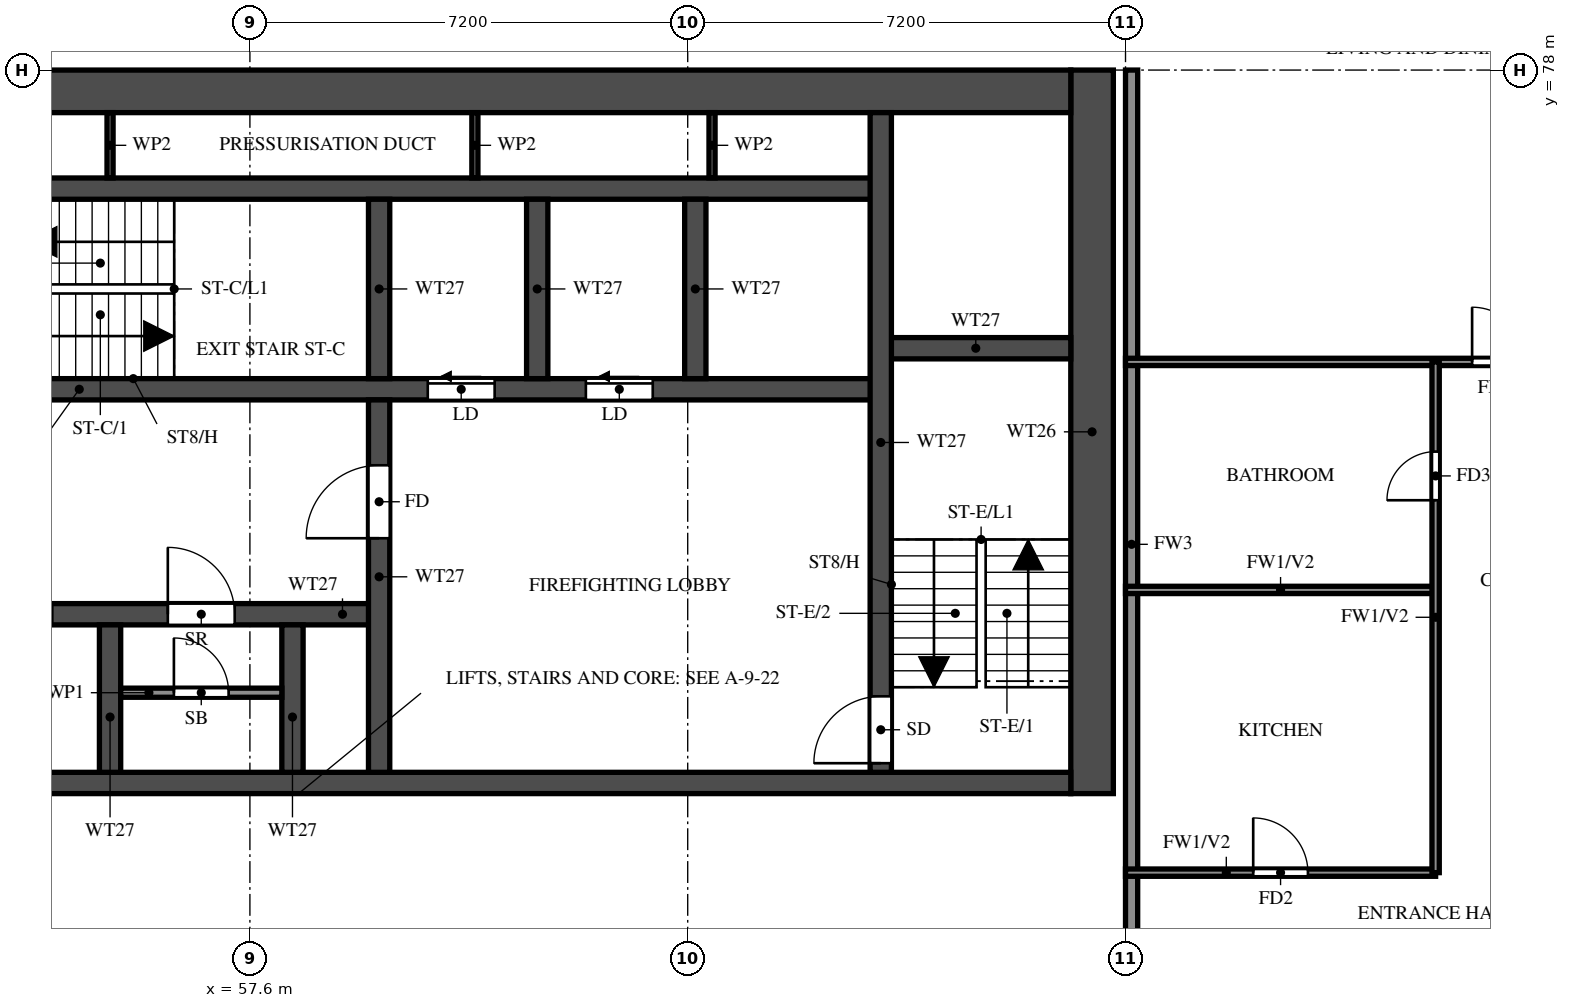
"""IFC4 building model, lengths in metres.
Left out: names, types, materials, properties, quantities, classifications, styles, units other than length and angle.
Written with IfcOpenShell. Run it as: python <this file> out.ifc"""

import sys

from ifc_helpers import new_model, si_unit, direction, frame, frame_2d, origin, place, context, subcontext, project, spatial, rectangle, extrude, element, fill, save


model = new_model("IFC4")
c1 = context("Model", 3, precision=1e-05, world=origin(), true_north=direction((0.0, 1.0)))
c2 = subcontext(c1, "Body", "Model", "MODEL_VIEW")
j1 = project(units=[si_unit("LENGTHUNIT", "METRE"), si_unit("PLANEANGLEUNIT", "RADIAN")], contexts=[c1])
p1 = place(None, origin())
s1 = spatial("IfcSite", under=j1, at=p1, CompositionType="ELEMENT")
p2 = place(p1, origin())
s2 = spatial("IfcBuilding", under=s1, at=p2, CompositionType="ELEMENT")
p3 = place(p2, frame((0.0, 0.0, 157.0)))
s3 = spatial("IfcBuildingStorey", under=s2, at=p3, CompositionType="ELEMENT", Elevation=157.0)
p4 = place(p3, frame((71.45, 66.1, 0.0), z_axis=(0.0, 0.0, 1.0), x_axis=(0.0, 1.0, 0.0)))
e1 = element("IfcWall", 1, at=p4, inside=s3, PredefinedType="SHEAR", context=c2, shape_type="SweptSolid", body=[
    extrude(rectangle(XDim=11.9, YDim=0.7, at=frame_2d((5.95, 0.0))), origin(), (0.0, 0.0, 1.0), 3.2),
])
p5 = place(p3, frame((29.7, 77.65, 0.0), z_axis=(0.0, 0.0, 1.0), x_axis=(1.0, 0.0, 0.0)))
e2 = element("IfcWall", 2, at=p5, inside=s3, PredefinedType="SHEAR", context=c2, shape_type="SweptSolid", body=[
    extrude(rectangle(XDim=41.4, YDim=0.7, at=frame_2d((20.7, 0.0))), origin(), (0.0, 0.0, 1.0), 3.2),
])
p6 = place(p3, frame((29.7, 66.275, 0.0), z_axis=(0.0, 0.0, 1.0), x_axis=(1.0, 0.0, 0.0)))
e3 = element("IfcWall", 3, at=p6, inside=s3, PredefinedType="SHEAR", context=c2, shape_type="SweptSolid", body=[
    extrude(rectangle(XDim=41.4, YDim=0.35, at=frame_2d((20.7, 0.0))), origin(), (0.0, 0.0, 1.0), 3.2),
])
p7 = place(p6, frame((0.925, 0.0, 0.0)))
e4 = element("IfcOpeningElement", 4, at=p7, cuts=e3, PredefinedType="OPENING", context=c2, shape_type="SweptSolid", body=[
    extrude(rectangle(XDim=1.1, YDim=2.1, at=frame_2d((0.55, 1.05))), frame((0.0, 0.185, 0.0), z_axis=(0.0, -1.0, 0.0), x_axis=(1.0, 0.0, 0.0)), (0.0, 0.0, 1.0), 0.37),
])
p8 = place(p6, frame((3.712, 0.0, 0.0)))
e5 = element("IfcOpeningElement", 5, at=p8, cuts=e3, PredefinedType="OPENING", context=c2, shape_type="SweptSolid", body=[
    extrude(rectangle(XDim=1.8, YDim=2.1, at=frame_2d((0.9, 1.05))), frame((0.0, 0.185, 0.0), z_axis=(0.0, -1.0, 0.0), x_axis=(1.0, 0.0, 0.0)), (0.0, 0.0, 1.0), 0.37),
])
p9 = place(p3, frame((35.625, 69.05, 0.0), z_axis=(0.0, 0.0, 1.0), x_axis=(1.0, 0.0, 0.0)))
e6 = element("IfcWall", 6, at=p9, inside=s3, PredefinedType="SHEAR", context=c2, shape_type="SweptSolid", body=[
    extrude(rectangle(XDim=24.1, YDim=0.35, at=frame_2d((12.05, 0.0))), origin(), (0.0, 0.0, 1.0), 3.2),
])
p10 = place(p9, frame((1.0, 0.0, 0.0)))
e7 = element("IfcOpeningElement", 7, at=p10, cuts=e6, PredefinedType="OPENING", context=c2, shape_type="SweptSolid", body=[
    extrude(rectangle(XDim=1.1, YDim=2.1, at=frame_2d((0.55, 1.05))), frame((0.0, 0.185, 0.0), z_axis=(0.0, -1.0, 0.0), x_axis=(1.0, 0.0, 0.0)), (0.0, 0.0, 1.0), 0.37),
])
p11 = place(p9, frame((3.75, 0.0, 0.0)))
e8 = element("IfcOpeningElement", 8, at=p11, cuts=e6, PredefinedType="OPENING", context=c2, shape_type="SweptSolid", body=[
    extrude(rectangle(XDim=1.1, YDim=2.1, at=frame_2d((0.55, 1.05))), frame((0.0, 0.185, 0.0), z_axis=(0.0, -1.0, 0.0), x_axis=(1.0, 0.0, 0.0)), (0.0, 0.0, 1.0), 0.37),
])
p12 = place(p9, frame((6.5, 0.0, 0.0)))
e9 = element("IfcOpeningElement", 9, at=p12, cuts=e6, PredefinedType="OPENING", context=c2, shape_type="SweptSolid", body=[
    extrude(rectangle(XDim=1.1, YDim=2.1, at=frame_2d((0.55, 1.05))), frame((0.0, 0.185, 0.0), z_axis=(0.0, -1.0, 0.0), x_axis=(1.0, 0.0, 0.0)), (0.0, 0.0, 1.0), 0.37),
])
p13 = place(p9, frame((9.25, 0.0, 0.0)))
e10 = element("IfcOpeningElement", 10, at=p13, cuts=e6, PredefinedType="OPENING", context=c2, shape_type="SweptSolid", body=[
    extrude(rectangle(XDim=1.1, YDim=2.1, at=frame_2d((0.55, 1.05))), frame((0.0, 0.185, 0.0), z_axis=(0.0, -1.0, 0.0), x_axis=(1.0, 0.0, 0.0)), (0.0, 0.0, 1.0), 0.37),
])
p14 = place(p9, frame((12.0, 0.0, 0.0)))
e11 = element("IfcOpeningElement", 11, at=p14, cuts=e6, PredefinedType="OPENING", context=c2, shape_type="SweptSolid", body=[
    extrude(rectangle(XDim=1.1, YDim=2.1, at=frame_2d((0.55, 1.05))), frame((0.0, 0.185, 0.0), z_axis=(0.0, -1.0, 0.0), x_axis=(1.0, 0.0, 0.0)), (0.0, 0.0, 1.0), 0.37),
])
p15 = place(p9, frame((14.75, 0.0, 0.0)))
e12 = element("IfcOpeningElement", 12, at=p15, cuts=e6, PredefinedType="OPENING", context=c2, shape_type="SweptSolid", body=[
    extrude(rectangle(XDim=1.1, YDim=2.1, at=frame_2d((0.55, 1.05))), frame((0.0, 0.185, 0.0), z_axis=(0.0, -1.0, 0.0), x_axis=(1.0, 0.0, 0.0)), (0.0, 0.0, 1.0), 0.37),
])
p16 = place(p9, frame((17.625, 0.0, 0.0)))
e13 = element("IfcOpeningElement", 13, at=p16, cuts=e6, PredefinedType="OPENING", context=c2, shape_type="SweptSolid", body=[
    extrude(rectangle(XDim=1.1, YDim=2.1, at=frame_2d((0.55, 1.05))), frame((0.0, 0.185, 0.0), z_axis=(0.0, -1.0, 0.0), x_axis=(1.0, 0.0, 0.0)), (0.0, 0.0, 1.0), 0.37),
])
p17 = place(p9, frame((20.625, 0.0, 0.0)))
e14 = element("IfcOpeningElement", 14, at=p17, cuts=e6, PredefinedType="OPENING", context=c2, shape_type="SweptSolid", body=[
    extrude(rectangle(XDim=1.1, YDim=2.1, at=frame_2d((0.55, 1.05))), frame((0.0, 0.185, 0.0), z_axis=(0.0, -1.0, 0.0), x_axis=(1.0, 0.0, 0.0)), (0.0, 0.0, 1.0), 0.37),
])
p18 = place(p3, frame((32.825, 72.75, 0.0), z_axis=(0.0, 0.0, 1.0), x_axis=(1.0, 0.0, 0.0)))
e15 = element("IfcWall", 15, at=p18, inside=s3, PredefinedType="SHEAR", context=c2, shape_type="SweptSolid", body=[
    extrude(rectangle(XDim=35.15, YDim=0.35, at=frame_2d((17.575, 0.0))), origin(), (0.0, 0.0, 1.0), 3.2),
])
p19 = place(p18, frame((19.8, 0.0, 0.0)))
e16 = element("IfcOpeningElement", 16, at=p19, cuts=e15, PredefinedType="OPENING", context=c2, shape_type="SweptSolid", body=[
    extrude(rectangle(XDim=1.1, YDim=2.1, at=frame_2d((0.55, 1.05))), frame((0.0, 0.185, 0.0), z_axis=(0.0, -1.0, 0.0), x_axis=(1.0, 0.0, 0.0)), (0.0, 0.0, 1.0), 0.37),
])
p20 = place(p18, frame((27.7, 0.0, 0.0)))
e17 = element("IfcOpeningElement", 17, at=p20, cuts=e15, PredefinedType="OPENING", context=c2, shape_type="SweptSolid", body=[
    extrude(rectangle(XDim=1.1, YDim=2.1, at=frame_2d((0.55, 1.05))), frame((0.0, 0.185, 0.0), z_axis=(0.0, -1.0, 0.0), x_axis=(1.0, 0.0, 0.0)), (0.0, 0.0, 1.0), 0.37),
])
p21 = place(p18, frame((30.3, 0.0, 0.0)))
e18 = element("IfcOpeningElement", 18, at=p21, cuts=e15, PredefinedType="OPENING", context=c2, shape_type="SweptSolid", body=[
    extrude(rectangle(XDim=1.1, YDim=2.1, at=frame_2d((0.55, 1.05))), frame((0.0, 0.185, 0.0), z_axis=(0.0, -1.0, 0.0), x_axis=(1.0, 0.0, 0.0)), (0.0, 0.0, 1.0), 0.37),
])
p22 = place(p18, frame((3.8, 0.0, 0.0)))
e19 = element("IfcOpeningElement", 19, at=p22, cuts=e15, PredefinedType="OPENING", context=c2, shape_type="SweptSolid", body=[
    extrude(rectangle(XDim=1.1, YDim=2.1, at=frame_2d((0.55, 1.05))), frame((0.0, 0.185, 0.0), z_axis=(0.0, -1.0, 0.0), x_axis=(1.0, 0.0, 0.0)), (0.0, 0.0, 1.0), 0.37),
])
p23 = place(p18, frame((6.55, 0.0, 0.0)))
e20 = element("IfcOpeningElement", 20, at=p23, cuts=e15, PredefinedType="OPENING", context=c2, shape_type="SweptSolid", body=[
    extrude(rectangle(XDim=1.1, YDim=2.1, at=frame_2d((0.55, 1.05))), frame((0.0, 0.185, 0.0), z_axis=(0.0, -1.0, 0.0), x_axis=(1.0, 0.0, 0.0)), (0.0, 0.0, 1.0), 0.37),
])
p24 = place(p18, frame((9.3, 0.0, 0.0)))
e21 = element("IfcOpeningElement", 21, at=p24, cuts=e15, PredefinedType="OPENING", context=c2, shape_type="SweptSolid", body=[
    extrude(rectangle(XDim=1.1, YDim=2.1, at=frame_2d((0.55, 1.05))), frame((0.0, 0.185, 0.0), z_axis=(0.0, -1.0, 0.0), x_axis=(1.0, 0.0, 0.0)), (0.0, 0.0, 1.0), 0.37),
])
p25 = place(p18, frame((12.05, 0.0, 0.0)))
e22 = element("IfcOpeningElement", 22, at=p25, cuts=e15, PredefinedType="OPENING", context=c2, shape_type="SweptSolid", body=[
    extrude(rectangle(XDim=1.1, YDim=2.1, at=frame_2d((0.55, 1.05))), frame((0.0, 0.185, 0.0), z_axis=(0.0, -1.0, 0.0), x_axis=(1.0, 0.0, 0.0)), (0.0, 0.0, 1.0), 0.37),
])
p26 = place(p18, frame((14.8, 0.0, 0.0)))
e23 = element("IfcOpeningElement", 23, at=p26, cuts=e15, PredefinedType="OPENING", context=c2, shape_type="SweptSolid", body=[
    extrude(rectangle(XDim=1.1, YDim=2.1, at=frame_2d((0.55, 1.05))), frame((0.0, 0.185, 0.0), z_axis=(0.0, -1.0, 0.0), x_axis=(1.0, 0.0, 0.0)), (0.0, 0.0, 1.0), 0.37),
])
p27 = place(p18, frame((17.55, 0.0, 0.0)))
e24 = element("IfcOpeningElement", 24, at=p27, cuts=e15, PredefinedType="OPENING", context=c2, shape_type="SweptSolid", body=[
    extrude(rectangle(XDim=1.1, YDim=2.1, at=frame_2d((0.55, 1.05))), frame((0.0, 0.185, 0.0), z_axis=(0.0, -1.0, 0.0), x_axis=(1.0, 0.0, 0.0)), (0.0, 0.0, 1.0), 0.37),
])
p28 = place(p18, frame((0.938, 0.0, 0.0)))
e25 = element("IfcOpeningElement", 25, at=p28, cuts=e15, PredefinedType="OPENING", context=c2, shape_type="SweptSolid", body=[
    extrude(rectangle(XDim=1.1, YDim=2.1, at=frame_2d((0.55, 1.05))), frame((0.0, 0.185, 0.0), z_axis=(0.0, -1.0, 0.0), x_axis=(1.0, 0.0, 0.0)), (0.0, 0.0, 1.0), 0.37),
])
p29 = place(p3, frame((32.825, 76.05, 0.0), z_axis=(0.0, 0.0, 1.0), x_axis=(1.0, 0.0, 0.0)))
e26 = element("IfcWall", 26, at=p29, inside=s3, PredefinedType="SHEAR", context=c2, shape_type="SweptSolid", body=[
    extrude(rectangle(XDim=35.15, YDim=0.35, at=frame_2d((17.575, 0.0))), origin(), (0.0, 0.0, 1.0), 3.2),
])
p30 = place(p3, frame((67.975, 73.425, 0.0), z_axis=(0.0, 0.0, 1.0), x_axis=(1.0, 0.0, 0.0)))
e27 = element("IfcWall", 27, at=p30, inside=s3, PredefinedType="SHEAR", context=c2, shape_type="SweptSolid", body=[
    extrude(rectangle(XDim=3.125, YDim=0.35, at=frame_2d((1.562, 0.0))), origin(), (0.0, 0.0, 1.0), 3.2),
])
p31 = place(p3, frame((67.975, 66.45, 0.0), z_axis=(0.0, 0.0, 1.0), x_axis=(0.0, 1.0, 0.0)))
e28 = element("IfcWall", 28, at=p31, inside=s3, PredefinedType="SHEAR", context=c2, shape_type="SweptSolid", body=[
    extrude(rectangle(XDim=10.85, YDim=0.35, at=frame_2d((5.425, 0.0))), origin(), (0.0, 0.0, 1.0), 3.2),
])
p32 = place(p31, frame((0.15, 0.0, 0.0)))
e29 = element("IfcOpeningElement", 29, at=p32, cuts=e28, PredefinedType="OPENING", context=c2, shape_type="SweptSolid", body=[
    extrude(rectangle(XDim=1.1, YDim=2.1, at=frame_2d((0.55, 1.05))), frame((0.0, 0.185, 0.0), z_axis=(0.0, -1.0, 0.0), x_axis=(1.0, 0.0, 0.0)), (0.0, 0.0, 1.0), 0.37),
])
p33 = place(p3, frame((59.725, 66.45, 0.0), z_axis=(0.0, 0.0, 1.0), x_axis=(0.0, 1.0, 0.0)))
e30 = element("IfcWall", 30, at=p33, inside=s3, PredefinedType="SHEAR", context=c2, shape_type="SweptSolid", body=[
    extrude(rectangle(XDim=6.125, YDim=0.35, at=frame_2d((3.062, 0.0))), origin(), (0.0, 0.0, 1.0), 3.2),
])
p34 = place(p33, frame((3.85, 0.0, 0.0)))
e31 = element("IfcOpeningElement", 31, at=p34, cuts=e30, PredefinedType="OPENING", context=c2, shape_type="SweptSolid", body=[
    extrude(rectangle(XDim=1.2, YDim=2.1, at=frame_2d((0.6, 1.05))), frame((0.0, 0.185, 0.0), z_axis=(0.0, -1.0, 0.0), x_axis=(1.0, 0.0, 0.0)), (0.0, 0.0, 1.0), 0.37),
])
p35 = place(p3, frame((59.725, 72.925, 0.0), z_axis=(0.0, 0.0, 1.0), x_axis=(0.0, 1.0, 0.0)))
e32 = element("IfcWall", 32, at=p35, inside=s3, PredefinedType="SHEAR", context=c2, shape_type="SweptSolid", body=[
    extrude(rectangle(XDim=2.95, YDim=0.35, at=frame_2d((1.475, 0.0))), origin(), (0.0, 0.0, 1.0), 3.2),
])
for number, where, z_axis, x_axis in (
    (33, (55.3, 66.45, 0.0), (0.0, 0.0, 1.0), (0.0, 1.0, 0.0)),
    (34, (58.3, 66.45, 0.0), (0.0, 0.0, 1.0), (0.0, 1.0, 0.0)),
):
    element("IfcWall", number, at=place(p3, frame(where, z_axis=z_axis, x_axis=x_axis)), inside=s3, PredefinedType="SHEAR", context=c2, shape_type="SweptSolid", body=[
        extrude(rectangle(XDim=2.425, YDim=0.35, at=frame_2d((1.212, 0.0))), origin(), (0.0, 0.0, 1.0), 3.2),
    ])
for number, where, z_axis, x_axis in (
    (35, (62.325, 72.925, 0.0), (0.0, 0.0, 1.0), (0.0, 1.0, 0.0)),
    (36, (64.925, 72.925, 0.0), (0.0, 0.0, 1.0), (0.0, 1.0, 0.0)),
):
    element("IfcWall", number, at=place(p3, frame(where, z_axis=z_axis, x_axis=x_axis)), inside=s3, PredefinedType="SHEAR", context=c2, shape_type="SweptSolid", body=[
        extrude(rectangle(XDim=2.95, YDim=0.35, at=frame_2d((1.475, 0.0))), origin(), (0.0, 0.0, 1.0), 3.2),
    ])
p36 = place(p3, frame((55.475, 67.76, 0.0), z_axis=(0.0, 0.0, 1.0), x_axis=(1.0, 0.0, 0.0)))
e37 = element("IfcWall", 37, at=p36, inside=s3, PredefinedType="PARTITIONING", context=c2, shape_type="SweptSolid", body=[
    extrude(rectangle(XDim=2.65, YDim=0.15, at=frame_2d((1.325, 0.0))), origin(), (0.0, 0.0, 1.0), 3.2),
])
p37 = place(p36, frame((0.875, 0.0, 0.0)))
e38 = element("IfcOpeningElement", 38, at=p37, cuts=e37, PredefinedType="OPENING", context=c2, shape_type="SweptSolid", body=[
    extrude(rectangle(XDim=0.9, YDim=2.1, at=frame_2d((0.45, 1.05))), frame((0.0, 0.085, 0.0), z_axis=(0.0, -1.0, 0.0), x_axis=(1.0, 0.0, 0.0)), (0.0, 0.0, 1.0), 0.17),
])
for number, where, z_axis, x_axis in (
    (39, (55.3, 76.225, 0.0), (0.0, 0.0, 1.0), (0.0, 1.0, 0.0)),
    (40, (61.3, 76.225, 0.0), (0.0, 0.0, 1.0), (0.0, 1.0, 0.0)),
    (41, (65.2, 76.225, 0.0), (0.0, 0.0, 1.0), (0.0, 1.0, 0.0)),
):
    element("IfcWall", number, at=place(p3, frame(where, z_axis=z_axis, x_axis=x_axis)), inside=s3, PredefinedType="PARTITIONING", context=c2, shape_type="SweptSolid", body=[
        extrude(rectangle(XDim=1.075, YDim=0.1, at=frame_2d((0.538, 0.0))), origin(), (0.0, 0.0, 1.0), 3.2),
    ])
p38 = place(p3, frame((72.1, 62.4, 0.0), z_axis=(0.0, 0.0, 1.0), x_axis=(0.0, 1.0, 0.0)))
e42 = element("IfcWall", 42, at=p38, inside=s3, PredefinedType="SOLIDWALL", context=c2, shape_type="SweptSolid", body=[
    extrude(rectangle(XDim=15.6, YDim=0.2, at=frame_2d((7.8, 0.0))), origin(), (0.0, 0.0, 1.0), 3.2),
])
p39 = place(p3, frame((72.0, 64.8, 0.0), z_axis=(0.0, 0.0, 1.0), x_axis=(1.0, 0.0, 0.0)))
e43 = element("IfcWall", 43, at=p39, inside=s3, PredefinedType="PARTITIONING", context=c2, shape_type="SweptSolid", body=[
    extrude(rectangle(XDim=5.1, YDim=0.12, at=frame_2d((2.55, 0.0))), origin(), (0.0, 0.0, 1.0), 3.2),
])
p40 = place(p39, frame((2.1, 0.0, 0.0)))
e44 = element("IfcOpeningElement", 44, at=p40, cuts=e43, PredefinedType="OPENING", context=c2, shape_type="SweptSolid", body=[
    extrude(rectangle(XDim=0.9, YDim=2.1, at=frame_2d((0.45, 1.05))), frame((0.0, 0.07, 0.0), z_axis=(0.0, -1.0, 0.0), x_axis=(1.0, 0.0, 0.0)), (0.0, 0.0, 1.0), 0.14),
])
p41 = place(p3, frame((72.0, 69.45, 0.0), z_axis=(0.0, 0.0, 1.0), x_axis=(1.0, 0.0, 0.0)))
e45 = element("IfcWall", 45, at=p41, inside=s3, PredefinedType="PARTITIONING", context=c2, shape_type="SweptSolid", body=[
    extrude(rectangle(XDim=5.1, YDim=0.12, at=frame_2d((2.55, 0.0))), origin(), (0.0, 0.0, 1.0), 3.2),
])
p42 = place(p3, frame((72.0, 73.2, 0.0), z_axis=(0.0, 0.0, 1.0), x_axis=(1.0, 0.0, 0.0)))
e46 = element("IfcWall", 46, at=p42, inside=s3, PredefinedType="PARTITIONING", context=c2, shape_type="SweptSolid", body=[
    extrude(rectangle(XDim=14.275, YDim=0.12, at=frame_2d((7.137, 0.0))), origin(), (0.0, 0.0, 1.0), 2.3),
])
p43 = place(p42, frame((5.7, 0.0, 0.0)))
e47 = element("IfcOpeningElement", 47, at=p43, cuts=e46, PredefinedType="OPENING", context=c2, shape_type="SweptSolid", body=[
    extrude(rectangle(XDim=0.9, YDim=2.1, at=frame_2d((0.45, 1.05))), frame((0.0, 0.07, 0.0), z_axis=(0.0, -1.0, 0.0), x_axis=(1.0, 0.0, 0.0)), (0.0, 0.0, 1.0), 0.14),
])
p44 = place(p3, frame((77.1, 64.8, 0.0), z_axis=(0.0, 0.0, 1.0), x_axis=(0.0, 1.0, 0.0)))
e48 = element("IfcWall", 48, at=p44, inside=s3, PredefinedType="PARTITIONING", context=c2, shape_type="SweptSolid", body=[
    extrude(rectangle(XDim=8.4, YDim=0.12, at=frame_2d((4.2, 0.0))), origin(), (0.0, 0.0, 1.0), 3.2),
])
p45 = place(p44, frame((6.125, 0.0, 0.0)))
e49 = element("IfcOpeningElement", 49, at=p45, cuts=e48, PredefinedType="OPENING", context=c2, shape_type="SweptSolid", body=[
    extrude(rectangle(XDim=0.8, YDim=2.1, at=frame_2d((0.4, 1.05))), frame((0.0, 0.07, 0.0), z_axis=(0.0, -1.0, 0.0), x_axis=(1.0, 0.0, 0.0)), (0.0, 0.0, 1.0), 0.14),
])
p46 = place(p32, origin())
e50 = element("IfcDoor", 50, at=p46, inside=s3, OperationType="SINGLE_SWING_LEFT", PredefinedType="DOOR", context=c2, shape_type="SweptSolid", body=[
    extrude(rectangle(XDim=1.1, YDim=2.1, at=frame_2d((0.55, 1.05))), frame((0.0, 0.025, 0.0), z_axis=(0.0, -1.0, 0.0), x_axis=(1.0, 0.0, 0.0)), (0.0, 0.0, 1.0), 0.05),
])
fill(e29, e50)
p47 = place(p34, origin())
e51 = element("IfcDoor", 51, at=p47, inside=s3, OperationType="SINGLE_SWING_LEFT", PredefinedType="DOOR", context=c2, shape_type="SweptSolid", body=[
    extrude(rectangle(XDim=1.2, YDim=2.1, at=frame_2d((0.6, 1.05))), frame((0.0, 0.025, 0.0), z_axis=(0.0, -1.0, 0.0), x_axis=(1.0, 0.0, 0.0)), (0.0, 0.0, 1.0), 0.05),
])
fill(e31, e51)
p48 = place(p20, origin())
e52 = element("IfcDoor", 52, at=p48, inside=s3, OperationType="SLIDING_TO_LEFT", PredefinedType="DOOR", context=c2, shape_type="SweptSolid", body=[
    extrude(rectangle(XDim=1.1, YDim=2.1, at=frame_2d((0.55, 1.05))), frame((0.0, 0.025, 0.0), z_axis=(0.0, -1.0, 0.0), x_axis=(1.0, 0.0, 0.0)), (0.0, 0.0, 1.0), 0.05),
])
fill(e17, e52)
p49 = place(p21, origin())
e53 = element("IfcDoor", 53, at=p49, inside=s3, OperationType="SLIDING_TO_LEFT", PredefinedType="DOOR", context=c2, shape_type="SweptSolid", body=[
    extrude(rectangle(XDim=1.1, YDim=2.1, at=frame_2d((0.55, 1.05))), frame((0.0, 0.025, 0.0), z_axis=(0.0, -1.0, 0.0), x_axis=(1.0, 0.0, 0.0)), (0.0, 0.0, 1.0), 0.05),
])
fill(e18, e53)
p50 = place(p17, origin())
e54 = element("IfcDoor", 54, at=p50, inside=s3, OperationType="SINGLE_SWING_RIGHT", PredefinedType="DOOR", context=c2, shape_type="SweptSolid", body=[
    extrude(rectangle(XDim=1.1, YDim=2.1, at=frame_2d((0.55, 1.05))), frame((0.0, 0.025, 0.0), z_axis=(0.0, -1.0, 0.0), x_axis=(1.0, 0.0, 0.0)), (0.0, 0.0, 1.0), 0.05),
])
fill(e14, e54)
p51 = place(p37, origin())
e55 = element("IfcDoor", 55, at=p51, inside=s3, OperationType="SINGLE_SWING_LEFT", PredefinedType="DOOR", context=c2, shape_type="SweptSolid", body=[
    extrude(rectangle(XDim=0.9, YDim=2.1, at=frame_2d((0.45, 1.05))), frame((0.0, 0.025, 0.0), z_axis=(0.0, -1.0, 0.0), x_axis=(1.0, 0.0, 0.0)), (0.0, 0.0, 1.0), 0.05),
])
fill(e38, e55)
p52 = place(p43, origin())
e56 = element("IfcDoor", 56, at=p52, inside=s3, OperationType="SINGLE_SWING_LEFT", PredefinedType="DOOR", context=c2, shape_type="SweptSolid", body=[
    extrude(rectangle(XDim=0.9, YDim=2.1, at=frame_2d((0.45, 1.05))), frame((0.0, 0.025, 0.0), z_axis=(0.0, -1.0, 0.0), x_axis=(1.0, 0.0, 0.0)), (0.0, 0.0, 1.0), 0.05),
])
fill(e47, e56)
p53 = place(p40, origin())
e57 = element("IfcDoor", 57, at=p53, inside=s3, OperationType="SINGLE_SWING_LEFT", PredefinedType="DOOR", context=c2, shape_type="SweptSolid", body=[
    extrude(rectangle(XDim=0.9, YDim=2.1, at=frame_2d((0.45, 1.05))), frame((0.0, 0.025, 0.0), z_axis=(0.0, -1.0, 0.0), x_axis=(1.0, 0.0, 0.0)), (0.0, 0.0, 1.0), 0.05),
])
fill(e44, e57)
p54 = place(p45, origin())
e58 = element("IfcDoor", 58, at=p54, inside=s3, OperationType="SINGLE_SWING_RIGHT", PredefinedType="DOOR", context=c2, shape_type="SweptSolid", body=[
    extrude(rectangle(XDim=0.8, YDim=2.1, at=frame_2d((0.4, 1.05))), frame((0.0, 0.025, 0.0), z_axis=(0.0, -1.0, 0.0), x_axis=(1.0, 0.0, 0.0)), (0.0, 0.0, 1.0), 0.05),
])
fill(e49, e58)
save(model, sys.argv[1])
